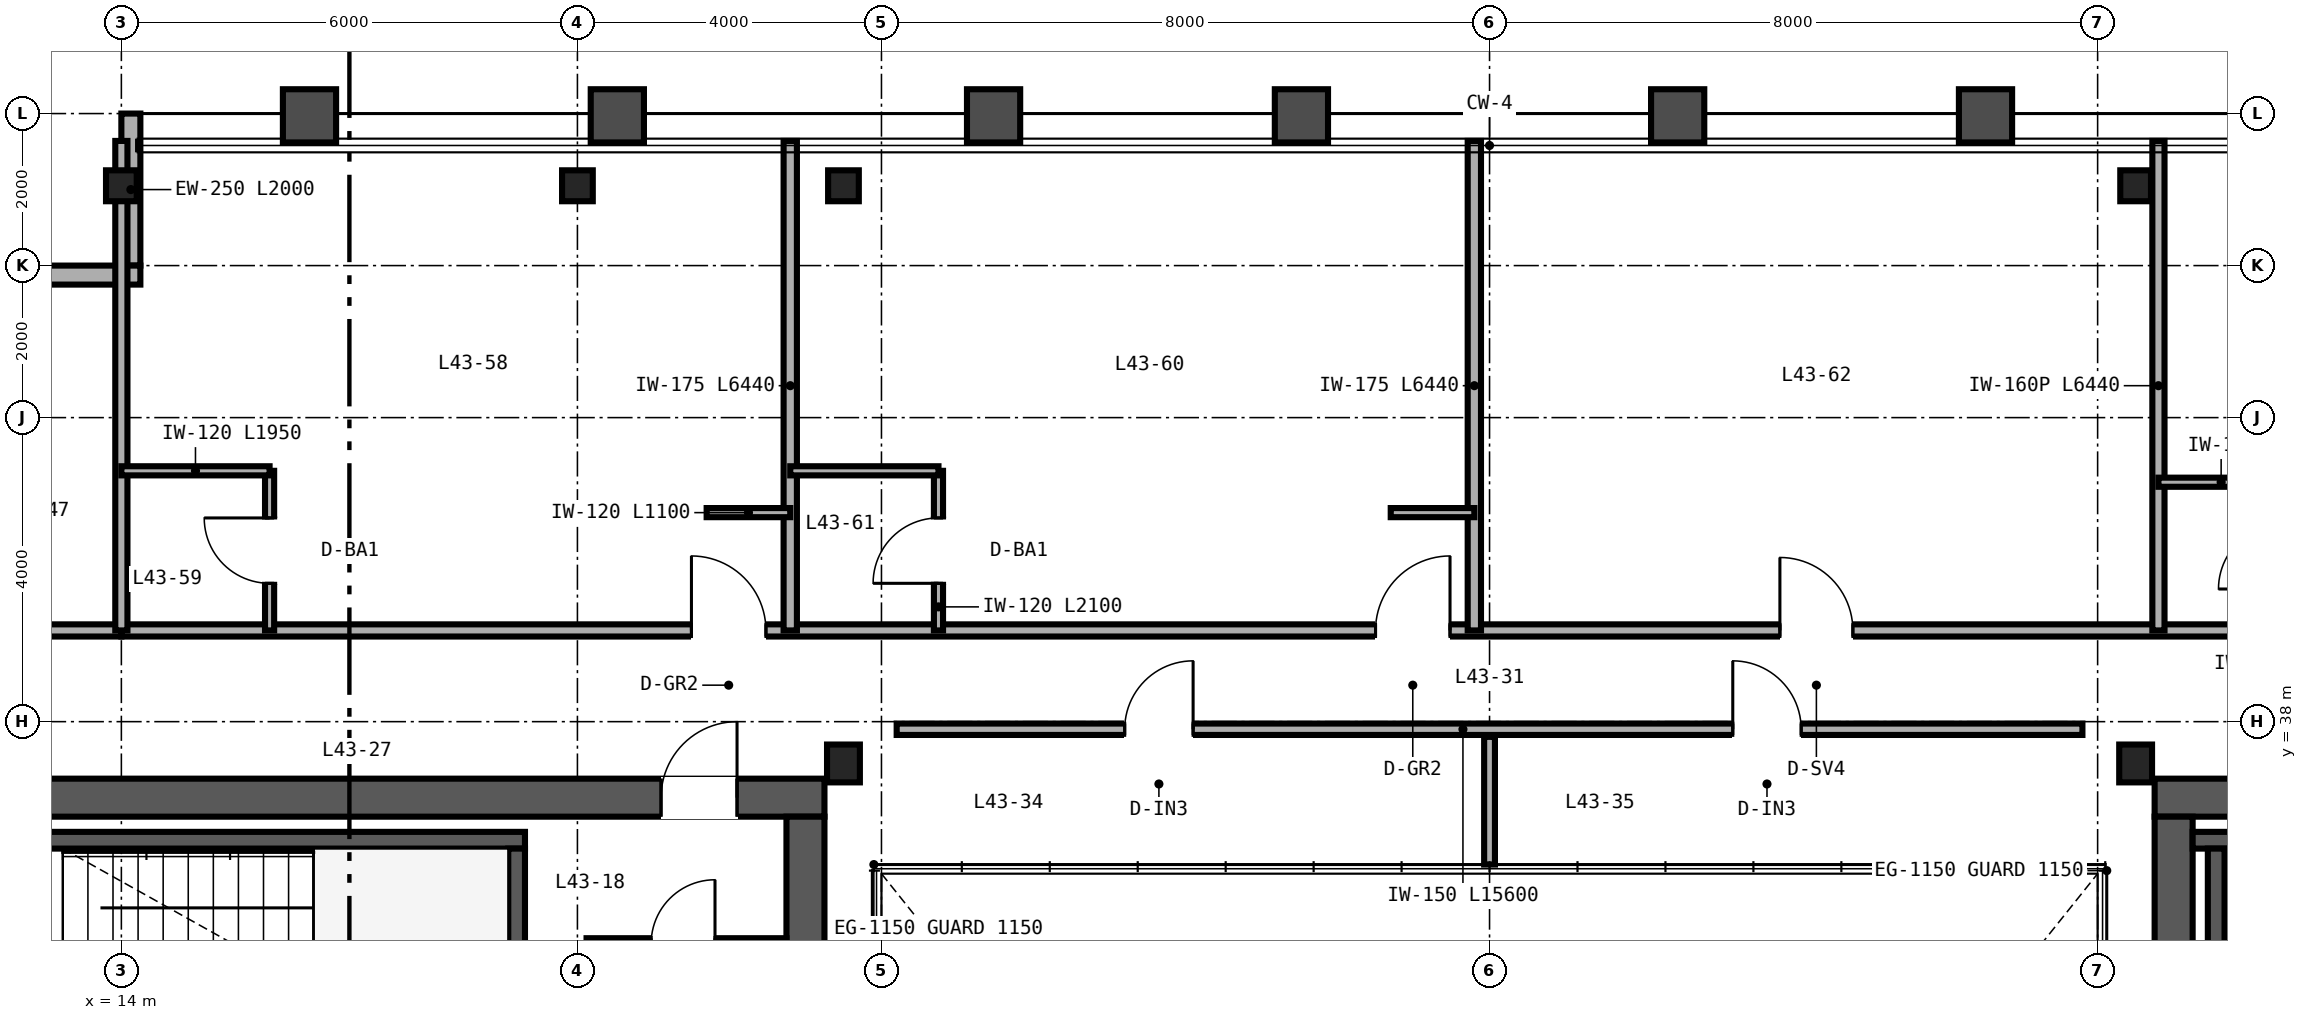
"""IFC4 building model, lengths in metres.
Left out: names, types, materials, properties, quantities, classifications, styles, units other than length and angle.
Written with IfcOpenShell. Run it as: python <this file> out.ifc"""

import sys

from ifc_helpers import new_model, si_unit, direction, frame, frame_2d, origin, origin_2d, place, context, subcontext, project, spatial, rectangle, i_section, extrude, source, transform, mapped, element, fill, save


model = new_model("IFC4")
c1 = context("Model", 3, precision=1e-05, world=origin(), true_north=direction((0.0, 1.0)))
c2 = subcontext(c1, "Body", "Model", "MODEL_VIEW")
j1 = project(units=[si_unit("LENGTHUNIT", "METRE"), si_unit("PLANEANGLEUNIT", "RADIAN")], contexts=[c1])
p1 = place(None, origin())
s1 = spatial("IfcSite", under=j1, at=p1, CompositionType="ELEMENT")
p2 = place(p1, origin())
s2 = spatial("IfcBuilding", under=s1, at=p2, CompositionType="ELEMENT")
p3 = place(p2, frame((0.0, 0.0, 174.0)))
s3 = spatial("IfcBuildingStorey", under=s2, at=p3, CompositionType="ELEMENT", Elevation=174.0)
p4 = place(p3, frame((10.75, 37.0, 0.0), z_axis=(0.0, 0.0, 1.0), x_axis=(1.0, 0.0, 0.0)))
e1 = element("IfcWall", 1, at=p4, inside=s3, PredefinedType="SHEAR", context=c2, shape_type="SweptSolid", body=[
    extrude(rectangle(XDim=12.5, YDim=0.5, at=frame_2d((6.25, 0.0))), origin(), (0.0, 0.0, 1.0), 3.37),
])
p5 = place(p4, frame((10.35, 0.0, 0.0)))
e2 = element("IfcOpeningElement", 2, at=p5, cuts=e1, PredefinedType="OPENING", context=c2, shape_type="SweptSolid", body=[
    extrude(rectangle(XDim=1.0, YDim=2.15, at=frame_2d((0.5, 1.075))), frame((0.0, 0.26, 0.0), z_axis=(0.0, -1.0, 0.0), x_axis=(1.0, 0.0, 0.0)), (0.0, 0.0, 1.0), 0.52),
])
p6 = place(p3, frame((23.0, 15.25, 0.0), z_axis=(0.0, 0.0, 1.0), x_axis=(0.0, 1.0, 0.0)))
e3 = element("IfcWall", 3, at=p6, inside=s3, PredefinedType="SHEAR", context=c2, shape_type="SweptSolid", body=[
    extrude(rectangle(XDim=21.5, YDim=0.5, at=frame_2d((10.75, 0.0))), origin(), (0.0, 0.0, 1.0), 3.37),
])
p7 = place(p3, frame((40.75, 37.0, 0.0), z_axis=(0.0, 0.0, 1.0), x_axis=(1.0, 0.0, 0.0)))
e4 = element("IfcWall", 4, at=p7, inside=s3, PredefinedType="SHEAR", context=c2, shape_type="SweptSolid", body=[
    extrude(rectangle(XDim=12.5, YDim=0.5, at=frame_2d((6.25, 0.0))), origin(), (0.0, 0.0, 1.0), 3.37),
])
p8 = place(p7, frame((9.95, 0.0, 0.0)))
e5 = element("IfcOpeningElement", 5, at=p8, cuts=e4, PredefinedType="OPENING", context=c2, shape_type="SweptSolid", body=[
    extrude(rectangle(XDim=1.1, YDim=2.15, at=frame_2d((0.55, 1.075))), frame((0.0, 0.26, 0.0), z_axis=(0.0, -1.0, 0.0), x_axis=(1.0, 0.0, 0.0)), (0.0, 0.0, 1.0), 0.52),
])
p9 = place(p3, frame((41.0, 15.25, 0.0), z_axis=(0.0, 0.0, 1.0), x_axis=(0.0, 1.0, 0.0)))
e6 = element("IfcWall", 6, at=p9, inside=s3, PredefinedType="SHEAR", context=c2, shape_type="SweptSolid", body=[
    extrude(rectangle(XDim=21.5, YDim=0.5, at=frame_2d((10.75, 0.0))), origin(), (0.0, 0.0, 1.0), 3.37),
])
p10 = place(p3, frame((11.25, 36.44, 0.0), z_axis=(0.0, 0.0, 1.0), x_axis=(1.0, 0.0, 0.0)))
e7 = element("IfcWall", 7, at=p10, inside=s3, PredefinedType="SHEAR", context=c2, shape_type="SweptSolid", body=[
    extrude(rectangle(XDim=8.06, YDim=0.22, at=frame_2d((4.03, 0.0))), origin(), (0.0, 0.0, 1.0), 3.4),
])
p11 = place(p3, frame((19.2, 33.05, 0.0), z_axis=(0.0, 0.0, 1.0), x_axis=(0.0, 1.0, 0.0)))
e8 = element("IfcWall", 8, at=p11, inside=s3, PredefinedType="SHEAR", context=c2, shape_type="SweptSolid", body=[
    extrude(rectangle(XDim=3.28, YDim=0.22, at=frame_2d((1.64, 0.0))), origin(), (0.0, 0.0, 1.0), 3.4),
])
p12 = place(p3, frame((41.25, 36.44, 0.0), z_axis=(0.0, 0.0, 1.0), x_axis=(1.0, 0.0, 0.0)))
e9 = element("IfcWall", 9, at=p12, inside=s3, PredefinedType="SHEAR", context=c2, shape_type="SweptSolid", body=[
    extrude(rectangle(XDim=8.06, YDim=0.22, at=frame_2d((4.03, 0.0))), origin(), (0.0, 0.0, 1.0), 3.4),
])
p13 = place(p3, frame((41.56, 33.05, 0.0), z_axis=(0.0, 0.0, 1.0), x_axis=(0.0, 1.0, 0.0)))
e10 = element("IfcWall", 10, at=p13, inside=s3, PredefinedType="SHEAR", context=c2, shape_type="SweptSolid", body=[
    extrude(rectangle(XDim=3.28, YDim=0.22, at=frame_2d((1.64, 0.0))), origin(), (0.0, 0.0, 1.0), 3.4),
])
m1 = source(origin(), c2, "Body", "SweptSolid", [
    extrude(i_section(OverallWidth=0.432, OverallDepth=0.498, WebThickness=0.056, FlangeThickness=0.089, FilletRadius=0.025, at=origin_2d()), origin(), (0.0, 0.0, 1.0), 3.37),
])
for number, where, z_axis, x_axis in (
    (11, (23.5, 37.45, 0.0), (0.0, 0.0, 1.0), (1.0, 0.0, 0.0)),
    (12, (40.5, 37.45, 0.0), (0.0, 0.0, 1.0), (1.0, 0.0, 0.0)),
):
    element("IfcColumn", number, at=place(p3, frame(where, z_axis=z_axis, x_axis=x_axis)), inside=s3, PredefinedType="COLUMN", context=c2, shape_type="MappedRepresentation", body=[
        mapped(m1, transform((0.0, 0.0, 0.0), scale=1.0)),
    ])
m2 = source(origin(), c2, "Body", "SweptSolid", [
    extrude(i_section(OverallWidth=0.404, OverallDepth=0.407, WebThickness=0.027, FlangeThickness=0.044, FilletRadius=0.025, at=origin_2d()), origin(), (0.0, 0.0, 1.0), 3.37),
])
for number, where, z_axis, x_axis in (
    (13, (14.0, 45.05, 0.0), (0.0, 0.0, 1.0), (1.0, 0.0, 0.0)),
    (14, (20.0, 45.05, 0.0), (0.0, 0.0, 1.0), (1.0, 0.0, 0.0)),
    (15, (23.5, 45.05, 0.0), (0.0, 0.0, 1.0), (1.0, 0.0, 0.0)),
    (16, (40.5, 45.05, 0.0), (0.0, 0.0, 1.0), (1.0, 0.0, 0.0)),
):
    element("IfcColumn", number, at=place(p3, frame(where, z_axis=z_axis, x_axis=x_axis)), inside=s3, PredefinedType="COLUMN", context=c2, shape_type="MappedRepresentation", body=[
        mapped(m2, transform((0.0, 0.0, 0.0), scale=1.0)),
    ])
p14 = place(p3, frame((14.125, 46.0, 0.0), z_axis=(0.0, 0.0, 1.0), x_axis=(0.0, -1.0, 0.0)))
e17 = element("IfcWall", 17, at=p14, inside=s3, PredefinedType="SOLIDWALL", context=c2, shape_type="SweptSolid", body=[
    extrude(rectangle(XDim=2.0, YDim=0.25, at=frame_2d((1.0, 0.0))), origin(), (0.0, 0.0, 1.0), 2.677),
])
p15 = place(p3, frame((14.25, 43.875, 0.0), z_axis=(0.0, 0.0, 1.0), x_axis=(-1.0, 0.0, 0.0)))
e18 = element("IfcWall", 18, at=p15, inside=s3, PredefinedType="SOLIDWALL", context=c2, shape_type="SweptSolid", body=[
    extrude(rectangle(XDim=2.0, YDim=0.25, at=frame_2d((1.0, 0.0))), origin(), (0.0, 0.0, 1.0), 3.37),
])
p16 = place(p3, frame((20.12, 35.08, 0.0), z_axis=(0.0, 0.0, 1.0), x_axis=(1.0, 0.0, 0.0)))
e19 = element("IfcWall", 19, at=p16, inside=s3, PredefinedType="PARTITIONING", context=c2, shape_type="SweptSolid", body=[
    extrude(rectangle(XDim=2.63, YDim=0.142, at=frame_2d((1.315, 0.0))), origin(), (0.0, 0.0, 1.0), 3.37),
])
p17 = place(p16, frame((0.85, 0.0, 0.0)))
e20 = element("IfcOpeningElement", 20, at=p17, cuts=e19, PredefinedType="OPENING", context=c2, shape_type="SweptSolid", body=[
    extrude(rectangle(XDim=0.84, YDim=2.1, at=frame_2d((0.42, 1.05))), frame((0.0, 0.081, 0.0), z_axis=(0.0, -1.0, 0.0), x_axis=(1.0, 0.0, 0.0)), (0.0, 0.0, 1.0), 0.162),
])
p18 = place(p3, frame((24.2, 37.9, 0.0), z_axis=(0.0, 0.0, 1.0), x_axis=(1.0, 0.0, 0.0)))
e21 = element("IfcWall", 21, at=p18, inside=s3, PredefinedType="PARTITIONING", context=c2, shape_type="SweptSolid", body=[
    extrude(rectangle(XDim=15.6, YDim=0.15, at=frame_2d((7.8, 0.0))), origin(), (0.0, 0.0, 1.0), 3.37),
])
p19 = place(p18, frame((3.0, 0.0, 0.0)))
e22 = element("IfcOpeningElement", 22, at=p19, cuts=e21, PredefinedType="OPENING", context=c2, shape_type="SweptSolid", body=[
    extrude(rectangle(XDim=0.9, YDim=2.15, at=frame_2d((0.45, 1.075))), frame((0.0, 0.085, 0.0), z_axis=(0.0, -1.0, 0.0), x_axis=(1.0, 0.0, 0.0)), (0.0, 0.0, 1.0), 0.17),
])
p20 = place(p18, frame((11.0, 0.0, 0.0)))
e23 = element("IfcOpeningElement", 23, at=p20, cuts=e21, PredefinedType="OPENING", context=c2, shape_type="SweptSolid", body=[
    extrude(rectangle(XDim=0.9, YDim=2.15, at=frame_2d((0.45, 1.075))), frame((0.0, 0.085, 0.0), z_axis=(0.0, -1.0, 0.0), x_axis=(1.0, 0.0, 0.0)), (0.0, 0.0, 1.0), 0.17),
])
p21 = place(p3, frame((32.0, 36.12, 0.0), z_axis=(0.0, 0.0, 1.0), x_axis=(0.0, 1.0, 0.0)))
e24 = element("IfcWall", 24, at=p21, inside=s3, PredefinedType="PARTITIONING", context=c2, shape_type="SweptSolid", body=[
    extrude(rectangle(XDim=1.68, YDim=0.142, at=frame_2d((0.84, 0.0))), origin(), (0.0, 0.0, 1.0), 3.37),
])
p22 = place(p3, frame((10.0, 39.2, 0.0), z_axis=(0.0, 0.0, 1.0), x_axis=(1.0, 0.0, 0.0)))
e25 = element("IfcWall", 25, at=p22, inside=s3, PredefinedType="PARTITIONING", context=c2, shape_type="SweptSolid", body=[
    extrude(rectangle(XDim=4.0, YDim=0.16, at=frame_2d((2.0, 0.0))), origin(), (0.0, 0.0, 1.0), 3.37),
])
p23 = place(p22, frame((1.52, 0.0, 0.0)))
e26 = element("IfcOpeningElement", 26, at=p23, cuts=e25, PredefinedType="OPENING", context=c2, shape_type="SweptSolid", body=[
    extrude(rectangle(XDim=0.96, YDim=2.15, at=frame_2d((0.48, 1.075))), frame((0.0, 0.09, 0.0), z_axis=(0.0, -1.0, 0.0), x_axis=(1.0, 0.0, 0.0)), (0.0, 0.0, 1.0), 0.18),
])
p24 = place(p3, frame((14.0, 39.2, 0.0), z_axis=(0.0, 0.0, 1.0), x_axis=(1.0, 0.0, 0.0)))
e27 = element("IfcWall", 27, at=p24, inside=s3, PredefinedType="PARTITIONING", context=c2, shape_type="SweptSolid", body=[
    extrude(rectangle(XDim=36.0, YDim=0.16, at=frame_2d((18.0, 0.0))), origin(), (0.0, 0.0, 1.0), 2.913),
])
p25 = place(p24, frame((7.5, 0.0, 0.0)))
e28 = element("IfcOpeningElement", 28, at=p25, cuts=e27, PredefinedType="OPENING", context=c2, shape_type="SweptSolid", body=[
    extrude(rectangle(XDim=0.98, YDim=2.2, at=frame_2d((0.49, 1.1))), frame((0.0, 0.09, 0.0), z_axis=(0.0, -1.0, 0.0), x_axis=(1.0, 0.0, 0.0)), (0.0, 0.0, 1.0), 0.18),
])
p26 = place(p24, frame((16.5, 0.0, 0.0)))
e29 = element("IfcOpeningElement", 29, at=p26, cuts=e27, PredefinedType="OPENING", context=c2, shape_type="SweptSolid", body=[
    extrude(rectangle(XDim=0.98, YDim=2.2, at=frame_2d((0.49, 1.1))), frame((0.0, 0.09, 0.0), z_axis=(0.0, -1.0, 0.0), x_axis=(1.0, 0.0, 0.0)), (0.0, 0.0, 1.0), 0.18),
])
p27 = place(p24, frame((21.82, 0.0, 0.0)))
e30 = element("IfcOpeningElement", 30, at=p27, cuts=e27, PredefinedType="OPENING", context=c2, shape_type="SweptSolid", body=[
    extrude(rectangle(XDim=0.96, YDim=2.15, at=frame_2d((0.48, 1.075))), frame((0.0, 0.09, 0.0), z_axis=(0.0, -1.0, 0.0), x_axis=(1.0, 0.0, 0.0)), (0.0, 0.0, 1.0), 0.18),
])
p28 = place(p24, frame((30.14, 0.0, 0.0)))
e31 = element("IfcOpeningElement", 31, at=p28, cuts=e27, PredefinedType="OPENING", context=c2, shape_type="SweptSolid", body=[
    extrude(rectangle(XDim=0.94, YDim=2.15, at=frame_2d((0.47, 1.075))), frame((0.0, 0.09, 0.0), z_axis=(0.0, -1.0, 0.0), x_axis=(1.0, 0.0, 0.0)), (0.0, 0.0, 1.0), 0.18),
])
p29 = place(p24, frame((34.74, 0.0, 0.0)))
e32 = element("IfcOpeningElement", 32, at=p29, cuts=e27, PredefinedType="OPENING", context=c2, shape_type="SweptSolid", body=[
    extrude(rectangle(XDim=0.94, YDim=2.15, at=frame_2d((0.47, 1.075))), frame((0.0, 0.09, 0.0), z_axis=(0.0, -1.0, 0.0), x_axis=(1.0, 0.0, 0.0)), (0.0, 0.0, 1.0), 0.18),
])
p30 = place(p3, frame((14.0, 39.2, 0.0), z_axis=(0.0, 0.0, 1.0), x_axis=(0.0, 1.0, 0.0)))
e33 = element("IfcWall", 33, at=p30, inside=s3, PredefinedType="PARTITIONING", context=c2, shape_type="SweptSolid", body=[
    extrude(rectangle(XDim=6.44, YDim=0.16, at=frame_2d((3.22, 0.0))), origin(), (0.0, 0.0, 1.0), 2.677),
])
p31 = place(p3, frame((22.8, 39.2, 0.0), z_axis=(0.0, 0.0, 1.0), x_axis=(0.0, 1.0, 0.0)))
e34 = element("IfcWall", 34, at=p31, inside=s3, PredefinedType="PARTITIONING", context=c2, shape_type="SweptSolid", body=[
    extrude(rectangle(XDim=6.44, YDim=0.175, at=frame_2d((3.22, 0.0))), origin(), (0.0, 0.0, 1.0), 2.833),
])
p32 = place(p3, frame((15.95, 39.2, 0.0), z_axis=(0.0, 0.0, 1.0), x_axis=(0.0, 1.0, 0.0)))
e35 = element("IfcWall", 35, at=p32, inside=s3, PredefinedType="PARTITIONING", context=c2, shape_type="SweptSolid", body=[
    extrude(rectangle(XDim=2.1, YDim=0.12, at=frame_2d((1.05, 0.0))), origin(), (0.0, 0.0, 1.0), 3.37),
])
p33 = place(p32, frame((0.62, 0.0, 0.0)))
e36 = element("IfcOpeningElement", 36, at=p33, cuts=e35, PredefinedType="OPENING", context=c2, shape_type="SweptSolid", body=[
    extrude(rectangle(XDim=0.86, YDim=2.1, at=frame_2d((0.43, 1.05))), frame((0.0, 0.07, 0.0), z_axis=(0.0, -1.0, 0.0), x_axis=(1.0, 0.0, 0.0)), (0.0, 0.0, 1.0), 0.14),
])
p34 = place(p3, frame((14.0, 41.3, 0.0), z_axis=(0.0, 0.0, 1.0), x_axis=(1.0, 0.0, 0.0)))
e37 = element("IfcWall", 37, at=p34, inside=s3, PredefinedType="PARTITIONING", context=c2, shape_type="SweptSolid", body=[
    extrude(rectangle(XDim=1.95, YDim=0.12, at=frame_2d((0.975, 0.0))), origin(), (0.0, 0.0, 1.0), 3.37),
])
p35 = place(p3, frame((21.7, 40.75, 0.0), z_axis=(0.0, 0.0, 1.0), x_axis=(1.0, 0.0, 0.0)))
e38 = element("IfcWall", 38, at=p35, inside=s3, PredefinedType="PARTITIONING", context=c2, shape_type="SweptSolid", body=[
    extrude(rectangle(XDim=1.1, YDim=0.12, at=frame_2d((0.55, 0.0))), origin(), (0.0, 0.0, 1.0), 3.37),
])
p36 = place(p3, frame((31.8, 39.2, 0.0), z_axis=(0.0, 0.0, 1.0), x_axis=(0.0, 1.0, 0.0)))
e39 = element("IfcWall", 39, at=p36, inside=s3, PredefinedType="PARTITIONING", context=c2, shape_type="SweptSolid", body=[
    extrude(rectangle(XDim=6.44, YDim=0.175, at=frame_2d((3.22, 0.0))), origin(), (0.0, 0.0, 1.0), 2.443),
])
p37 = place(p3, frame((24.75, 39.2, 0.0), z_axis=(0.0, 0.0, 1.0), x_axis=(0.0, 1.0, 0.0)))
e40 = element("IfcWall", 40, at=p37, inside=s3, PredefinedType="PARTITIONING", context=c2, shape_type="SweptSolid", body=[
    extrude(rectangle(XDim=2.1, YDim=0.12, at=frame_2d((1.05, 0.0))), origin(), (0.0, 0.0, 1.0), 3.37),
])
p38 = place(p37, frame((0.62, 0.0, 0.0)))
e41 = element("IfcOpeningElement", 41, at=p38, cuts=e40, PredefinedType="OPENING", context=c2, shape_type="SweptSolid", body=[
    extrude(rectangle(XDim=0.86, YDim=2.1, at=frame_2d((0.43, 1.05))), frame((0.0, 0.07, 0.0), z_axis=(0.0, -1.0, 0.0), x_axis=(1.0, 0.0, 0.0)), (0.0, 0.0, 1.0), 0.14),
])
p39 = place(p3, frame((22.8, 41.3, 0.0), z_axis=(0.0, 0.0, 1.0), x_axis=(1.0, 0.0, 0.0)))
e42 = element("IfcWall", 42, at=p39, inside=s3, PredefinedType="PARTITIONING", context=c2, shape_type="SweptSolid", body=[
    extrude(rectangle(XDim=1.95, YDim=0.12, at=frame_2d((0.975, 0.0))), origin(), (0.0, 0.0, 1.0), 2.913),
])
p40 = place(p3, frame((30.7, 40.75, 0.0), z_axis=(0.0, 0.0, 1.0), x_axis=(1.0, 0.0, 0.0)))
e43 = element("IfcWall", 43, at=p40, inside=s3, PredefinedType="PARTITIONING", context=c2, shape_type="SweptSolid", body=[
    extrude(rectangle(XDim=1.1, YDim=0.12, at=frame_2d((0.55, 0.0))), origin(), (0.0, 0.0, 1.0), 3.37),
])
p41 = place(p3, frame((40.8, 39.2, 0.0), z_axis=(0.0, 0.0, 1.0), x_axis=(0.0, 1.0, 0.0)))
e44 = element("IfcWall", 44, at=p41, inside=s3, PredefinedType="PARTITIONING", context=c2, shape_type="SweptSolid", body=[
    extrude(rectangle(XDim=6.44, YDim=0.16, at=frame_2d((3.22, 0.0))), origin(), (0.0, 0.0, 1.0), 2.443),
])
p42 = place(p3, frame((40.8, 41.15, 0.0), z_axis=(0.0, 0.0, 1.0), x_axis=(1.0, 0.0, 0.0)))
e45 = element("IfcWall", 45, at=p42, inside=s3, PredefinedType="PARTITIONING", context=c2, shape_type="SweptSolid", body=[
    extrude(rectangle(XDim=1.65, YDim=0.12, at=frame_2d((0.825, 0.0))), origin(), (0.0, 0.0, 1.0), 3.37),
])
m3 = source(origin(), c2, "Body", "SweptSolid", [
    extrude(rectangle(XDim=1.0, YDim=2.15, at=frame_2d((0.5, 1.075))), frame((0.0, 0.025, 0.0), z_axis=(0.0, -1.0, 0.0), x_axis=(1.0, 0.0, 0.0)), (0.0, 0.0, 1.0), 0.05),
])
p43 = place(p5, origin())
e46 = element("IfcDoor", 46, at=p43, inside=s3, OperationType="SINGLE_SWING_RIGHT", PredefinedType="DOOR", context=c2, shape_type="MappedRepresentation", body=[
    mapped(m3, transform((0.0, 0.0, 0.0), scale=1.0)),
])
fill(e2, e46)
m4 = source(origin(), c2, "Body", "SweptSolid", [
    extrude(rectangle(XDim=0.9, YDim=2.15, at=frame_2d((0.45, 1.075))), frame((0.0, 0.025, 0.0), z_axis=(0.0, -1.0, 0.0), x_axis=(1.0, 0.0, 0.0)), (0.0, 0.0, 1.0), 0.05),
])
p44 = place(p19, origin())
e47 = element("IfcDoor", 47, at=p44, inside=s3, OperationType="SINGLE_SWING_RIGHT", PredefinedType="DOOR", context=c2, shape_type="MappedRepresentation", body=[
    mapped(m4, transform((0.0, 0.0, 0.0), scale=1.0)),
])
fill(e22, e47)
p45 = place(p20, origin())
e48 = element("IfcDoor", 48, at=p45, inside=s3, OperationType="SINGLE_SWING_LEFT", PredefinedType="DOOR", context=c2, shape_type="MappedRepresentation", body=[
    mapped(m4, transform((0.0, 0.0, 0.0), scale=1.0)),
])
fill(e23, e48)
m5 = source(origin(), c2, "Body", "SweptSolid", [
    extrude(rectangle(XDim=0.86, YDim=2.1, at=frame_2d((0.43, 1.05))), frame((0.0, 0.025, 0.0), z_axis=(0.0, -1.0, 0.0), x_axis=(1.0, 0.0, 0.0)), (0.0, 0.0, 1.0), 0.05),
])
p46 = place(p33, origin())
e49 = element("IfcDoor", 49, at=p46, inside=s3, OperationType="SINGLE_SWING_RIGHT", PredefinedType="DOOR", context=c2, shape_type="MappedRepresentation", body=[
    mapped(m5, transform((0.0, 0.0, 0.0), scale=1.0)),
])
fill(e36, e49)
p47 = place(p38, origin())
e50 = element("IfcDoor", 50, at=p47, inside=s3, OperationType="SINGLE_SWING_LEFT", PredefinedType="DOOR", context=c2, shape_type="MappedRepresentation", body=[
    mapped(m5, transform((0.0, 0.0, 0.0), scale=1.0)),
])
fill(e41, e50)
m6 = source(origin(), c2, "Body", "SweptSolid", [
    extrude(rectangle(XDim=0.98, YDim=2.2, at=frame_2d((0.49, 1.1))), frame((0.0, 0.025, 0.0), z_axis=(0.0, -1.0, 0.0), x_axis=(1.0, 0.0, 0.0)), (0.0, 0.0, 1.0), 0.05),
])
p48 = place(p25, origin())
e51 = element("IfcDoor", 51, at=p48, inside=s3, OperationType="SINGLE_SWING_LEFT", PredefinedType="DOOR", context=c2, shape_type="MappedRepresentation", body=[
    mapped(m6, transform((0.0, 0.0, 0.0), scale=1.0)),
])
fill(e28, e51)
p49 = place(p26, origin())
e52 = element("IfcDoor", 52, at=p49, inside=s3, OperationType="SINGLE_SWING_RIGHT", PredefinedType="DOOR", context=c2, shape_type="MappedRepresentation", body=[
    mapped(m6, transform((0.0, 0.0, 0.0), scale=1.0)),
])
fill(e29, e52)
m7 = source(origin(), c2, "Body", "SweptSolid", [
    extrude(rectangle(XDim=0.96, YDim=2.15, at=frame_2d((0.48, 1.075))), frame((0.0, 0.025, 0.0), z_axis=(0.0, -1.0, 0.0), x_axis=(1.0, 0.0, 0.0)), (0.0, 0.0, 1.0), 0.05),
])
p50 = place(p27, origin())
e53 = element("IfcDoor", 53, at=p50, inside=s3, OperationType="SINGLE_SWING_LEFT", PredefinedType="DOOR", context=c2, shape_type="MappedRepresentation", body=[
    mapped(m7, transform((0.0, 0.0, 0.0), scale=1.0)),
])
fill(e30, e53)
save(model, sys.argv[1])
